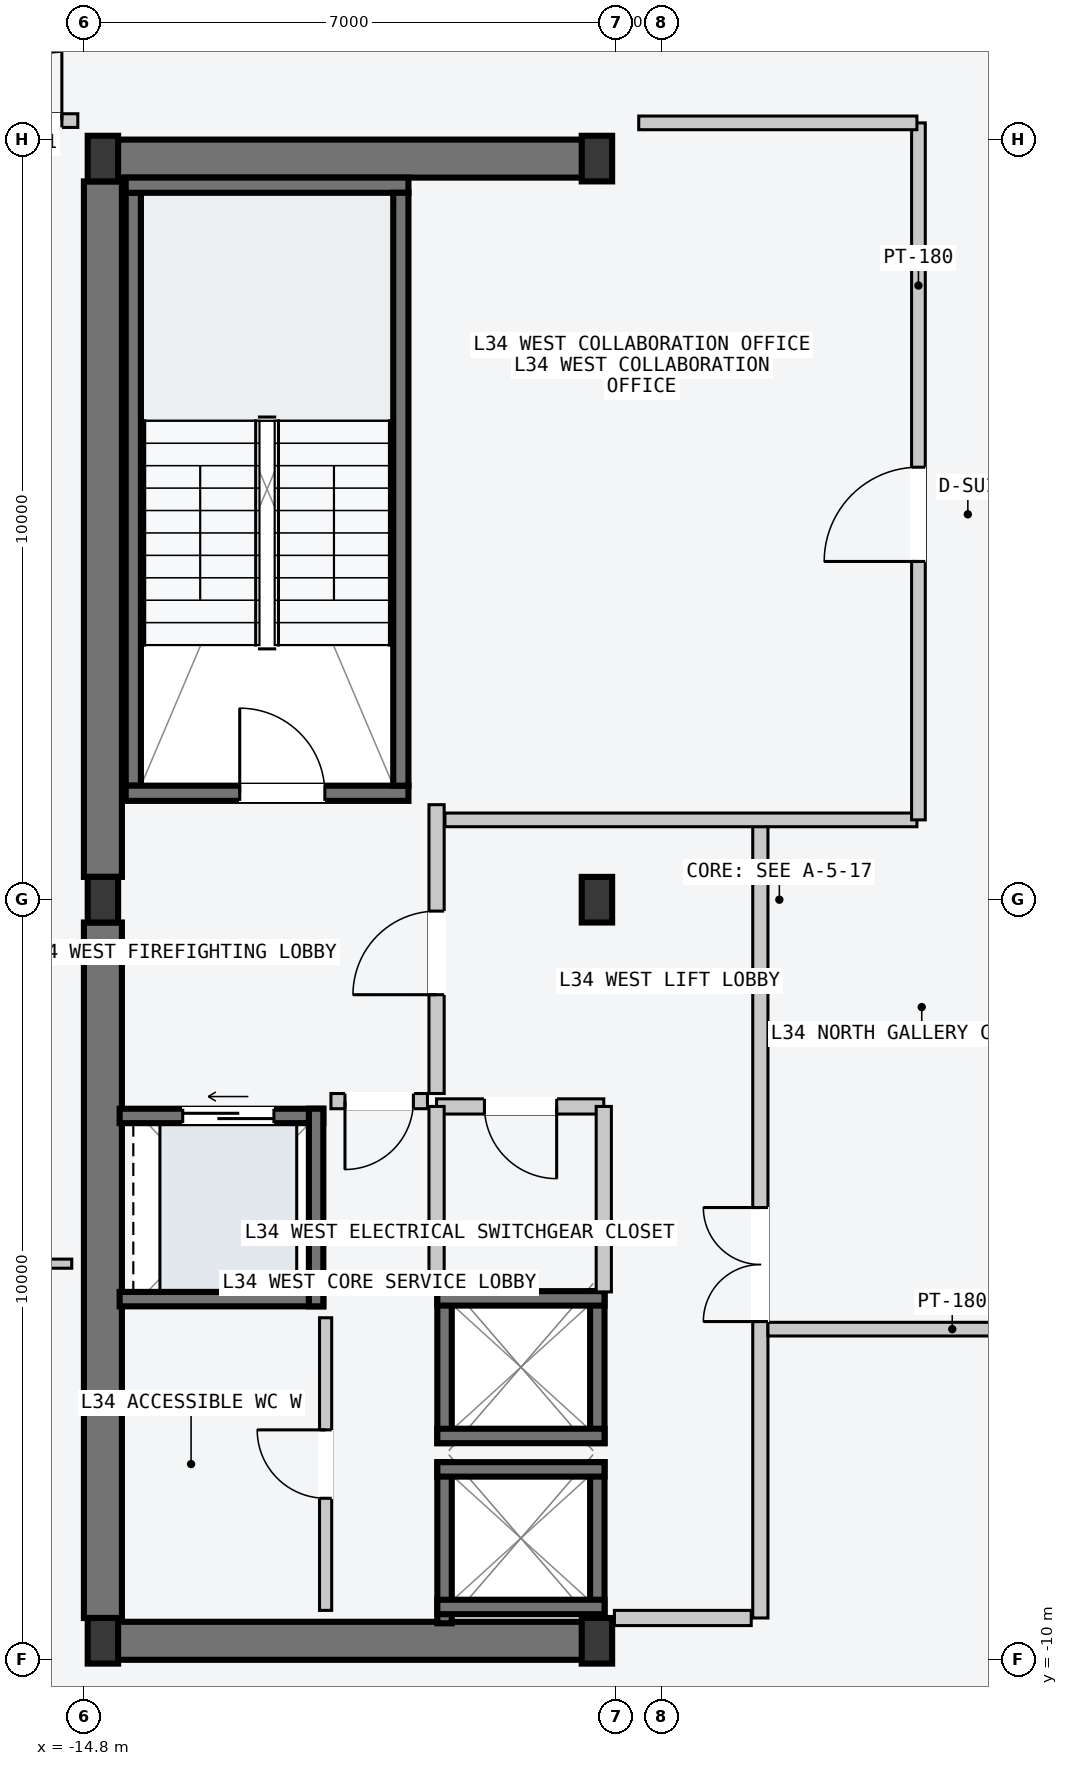
"""IFC4 building model, lengths in metres.
Left out: names, types, materials, properties, quantities, classifications, styles, units other than length and angle.
Written with IfcOpenShell. Run it as: python <this file> out.ifc"""

import sys

from ifc_helpers import new_model, si_unit, direction, frame, frame_2d, origin, origin_2d, place, context, subcontext, project, spatial, rectangle, i_section, extrude, element, fill, save


model = new_model("IFC4")
c1 = context("Model", 3, precision=1e-05, world=origin(), true_north=direction((0.0, 1.0)))
c2 = subcontext(c1, "Body", "Model", "MODEL_VIEW")
j1 = project(units=[si_unit("LENGTHUNIT", "METRE"), si_unit("PLANEANGLEUNIT", "RADIAN")], contexts=[c1])
p1 = place(None, origin())
s1 = spatial("IfcSite", under=j1, at=p1, CompositionType="ELEMENT")
p2 = place(p1, origin())
s2 = spatial("IfcBuilding", under=s1, at=p2, CompositionType="ELEMENT")
p3 = place(p2, frame((0.0, 0.0, 131.4)))
s3 = spatial("IfcBuildingStorey", under=s2, at=p3, CompositionType="ELEMENT", Elevation=131.4)
for number, where, z_axis, x_axis in (
    (1, (-14.53, -9.75, -0.2), (0.0, 0.0, 1.0), (1.0, 0.0, 0.0)),
    (2, (-14.53, 9.75, -0.2), (0.0, 0.0, 1.0), (1.0, 0.0, 0.0)),
):
    element("IfcWall", number, at=place(p3, frame(where, z_axis=z_axis, x_axis=x_axis)), inside=s3, PredefinedType="SHEAR", context=c2, shape_type="SweptSolid", body=[
        extrude(rectangle(XDim=6.46, YDim=0.5, at=frame_2d((3.23, 0.0))), origin(), (0.0, 0.0, 1.0), 3.6),
    ])
for number, where, z_axis, x_axis in (
    (3, (-14.55, -9.45, -0.2), (0.0, 0.0, 1.0), (0.0, 1.0, 0.0)),
    (4, (-14.55, 0.3, -0.2), (0.0, 0.0, 1.0), (0.0, 1.0, 0.0)),
):
    element("IfcWall", number, at=place(p3, frame(where, z_axis=z_axis, x_axis=x_axis)), inside=s3, PredefinedType="SHEAR", context=c2, shape_type="SweptSolid", body=[
        extrude(rectangle(XDim=9.15, YDim=0.5, at=frame_2d((4.575, 0.0))), origin(), (0.0, 0.0, 1.0), 3.6),
    ])
p4 = place(p3, frame((-14.15, 1.5, -0.2), z_axis=(0.0, 0.0, 1.0), x_axis=(0.0, 1.0, 0.0)))
e5 = element("IfcWall", 5, at=p4, inside=s3, PredefinedType="SOLIDWALL", context=c2, shape_type="SweptSolid", body=[
    extrude(rectangle(XDim=7.8, YDim=0.2, at=frame_2d((3.9, 0.0))), origin(), (0.0, 0.0, 1.0), 3.6),
])
p5 = place(p3, frame((-14.25, 1.4, -0.2), z_axis=(0.0, 0.0, 1.0), x_axis=(1.0, 0.0, 0.0)))
e6 = element("IfcWall", 6, at=p5, inside=s3, PredefinedType="SOLIDWALL", context=c2, shape_type="SweptSolid", body=[
    extrude(rectangle(XDim=3.72, YDim=0.2, at=frame_2d((1.86, 0.0))), origin(), (0.0, 0.0, 1.0), 3.6),
])
p6 = place(p5, frame((1.5, 0.0, 0.2)))
e7 = element("IfcOpeningElement", 7, at=p6, cuts=e6, PredefinedType="OPENING", context=c2, shape_type="SweptSolid", body=[
    extrude(rectangle(XDim=1.12, YDim=2.18, at=frame_2d((0.56, 1.09))), frame((0.0, 0.11, 0.0), z_axis=(0.0, -1.0, 0.0), x_axis=(1.0, 0.0, 0.0)), (0.0, 0.0, 1.0), 0.22),
])
p7 = place(p3, frame((-14.25, 9.4, -0.2), z_axis=(0.0, 0.0, 1.0), x_axis=(1.0, 0.0, 0.0)))
e8 = element("IfcWall", 8, at=p7, inside=s3, PredefinedType="SOLIDWALL", context=c2, shape_type="SweptSolid", body=[
    extrude(rectangle(XDim=3.72, YDim=0.2, at=frame_2d((1.86, 0.0))), origin(), (0.0, 0.0, 1.0), 3.6),
])
p8 = place(p3, frame((-10.63, 1.5, -0.2), z_axis=(0.0, 0.0, 1.0), x_axis=(0.0, 1.0, 0.0)))
e9 = element("IfcWall", 9, at=p8, inside=s3, PredefinedType="SOLIDWALL", context=c2, shape_type="SweptSolid", body=[
    extrude(rectangle(XDim=7.8, YDim=0.2, at=frame_2d((3.9, 0.0))), origin(), (0.0, 0.0, 1.0), 3.6),
])
for number, where, z_axis, x_axis in (
    (10, (-14.55, -9.75, 0.0), (0.0, 0.0, 1.0), (1.0, 0.0, 0.0)),
    (11, (-14.55, 0.0, 0.0), (0.0, 0.0, 1.0), (1.0, 0.0, 0.0)),
    (12, (-14.55, 9.75, 0.0), (0.0, 0.0, 1.0), (1.0, 0.0, 0.0)),
    (13, (-8.05, -9.75, 0.0), (0.0, 0.0, 1.0), (1.0, 0.0, 0.0)),
    (14, (-8.05, 0.0, 0.0), (0.0, 0.0, 1.0), (1.0, 0.0, 0.0)),
    (15, (-8.05, 9.75, 0.0), (0.0, 0.0, 1.0), (1.0, 0.0, 0.0)),
):
    element("IfcColumn", number, at=place(p3, frame(where, z_axis=z_axis, x_axis=x_axis)), inside=s3, PredefinedType="COLUMN", context=c2, shape_type="SweptSolid", body=[
        extrude(i_section(OverallWidth=0.4, OverallDepth=0.6, WebThickness=0.022, FlangeThickness=0.036, at=origin_2d()), origin(), (0.0, 0.0, 1.0), 3.6),
    ])
for number, where, z_axis, x_axis in (
    (16, (-8.045, -9.52, -0.2), (0.0, 0.0, 1.0), (0.0, 1.0, 0.0)),
    (17, (-10.055, -9.52, -0.2), (0.0, 0.0, 1.0), (0.0, 1.0, 0.0)),
):
    element("IfcWall", number, at=place(p3, frame(where, z_axis=z_axis, x_axis=x_axis)), inside=s3, PredefinedType="SOLIDWALL", context=c2, shape_type="SweptSolid", body=[
        extrude(rectangle(XDim=2.12, YDim=0.19, at=frame_2d((1.06, 0.0))), origin(), (0.0, 0.0, 1.0), 3.6),
    ])
for number, where, z_axis, x_axis in (
    (18, (-10.15, -7.495, -0.2), (0.0, 0.0, 1.0), (1.0, 0.0, 0.0)),
    (19, (-10.15, -9.305, -0.2), (0.0, 0.0, 1.0), (1.0, 0.0, 0.0)),
):
    element("IfcWall", number, at=place(p3, frame(where, z_axis=z_axis, x_axis=x_axis)), inside=s3, PredefinedType="SOLIDWALL", context=c2, shape_type="SweptSolid", body=[
        extrude(rectangle(XDim=2.2, YDim=0.19, at=frame_2d((1.1, 0.0))), origin(), (0.0, 0.0, 1.0), 3.6),
    ])
for number, where, z_axis, x_axis in (
    (20, (-8.045, -7.15, -0.2), (0.0, 0.0, 1.0), (0.0, 1.0, 0.0)),
    (21, (-10.055, -7.15, -0.2), (0.0, 0.0, 1.0), (0.0, 1.0, 0.0)),
):
    element("IfcWall", number, at=place(p3, frame(where, z_axis=z_axis, x_axis=x_axis)), inside=s3, PredefinedType="SOLIDWALL", context=c2, shape_type="SweptSolid", body=[
        extrude(rectangle(XDim=2.0, YDim=0.19, at=frame_2d((1.0, 0.0))), origin(), (0.0, 0.0, 1.0), 3.6),
    ])
for number, where, z_axis, x_axis in (
    (22, (-10.15, -5.245, -0.2), (0.0, 0.0, 1.0), (1.0, 0.0, 0.0)),
    (23, (-10.15, -7.055, -0.2), (0.0, 0.0, 1.0), (1.0, 0.0, 0.0)),
):
    element("IfcWall", number, at=place(p3, frame(where, z_axis=z_axis, x_axis=x_axis)), inside=s3, PredefinedType="SOLIDWALL", context=c2, shape_type="SweptSolid", body=[
        extrude(rectangle(XDim=2.2, YDim=0.19, at=frame_2d((1.1, 0.0))), origin(), (0.0, 0.0, 1.0), 3.6),
    ])
p9 = place(p3, frame((-14.33, -2.845, -0.2), z_axis=(0.0, 0.0, 1.0), x_axis=(1.0, 0.0, 0.0)))
e24 = element("IfcWall", 24, at=p9, inside=s3, PredefinedType="SOLIDWALL", context=c2, shape_type="SweptSolid", body=[
    extrude(rectangle(XDim=2.68, YDim=0.19, at=frame_2d((1.34, 0.0))), origin(), (0.0, 0.0, 1.0), 3.6),
])
p10 = place(p9, frame((0.83, 0.0, 0.2)))
e25 = element("IfcOpeningElement", 25, at=p10, cuts=e24, PredefinedType="OPENING", context=c2, shape_type="SweptSolid", body=[
    extrude(rectangle(XDim=1.2, YDim=2.2, at=frame_2d((0.6, 1.1))), frame((0.0, 0.105, 0.0), z_axis=(0.0, -1.0, 0.0), x_axis=(1.0, 0.0, 0.0)), (0.0, 0.0, 1.0), 0.21),
])
p11 = place(p3, frame((-14.33, -5.255, -0.2), z_axis=(0.0, 0.0, 1.0), x_axis=(1.0, 0.0, 0.0)))
e26 = element("IfcWall", 26, at=p11, inside=s3, PredefinedType="SOLIDWALL", context=c2, shape_type="SweptSolid", body=[
    extrude(rectangle(XDim=2.68, YDim=0.19, at=frame_2d((1.34, 0.0))), origin(), (0.0, 0.0, 1.0), 3.6),
])
p12 = place(p3, frame((-11.745, -5.35, -0.2), z_axis=(0.0, 0.0, 1.0), x_axis=(0.0, 1.0, 0.0)))
e27 = element("IfcWall", 27, at=p12, inside=s3, PredefinedType="SOLIDWALL", context=c2, shape_type="SweptSolid", body=[
    extrude(rectangle(XDim=2.6, YDim=0.19, at=frame_2d((1.3, 0.0))), origin(), (0.0, 0.0, 1.0), 3.6),
])
p13 = place(p3, frame((-5.9, -9.45, 0.0), z_axis=(0.0, 0.0, 1.0), x_axis=(0.0, 1.0, 0.0)))
e28 = element("IfcWall", 28, at=p13, inside=s3, PredefinedType="PARTITIONING", context=c2, shape_type="SweptSolid", body=[
    extrude(rectangle(XDim=10.5, YDim=0.2, at=frame_2d((5.25, 0.0))), origin(), (0.0, 0.0, 1.0), 3.4),
])
p14 = place(p13, frame((3.9, 0.0, 0.0)))
e29 = element("IfcOpeningElement", 29, at=p14, cuts=e28, PredefinedType="OPENING", context=c2, shape_type="SweptSolid", body=[
    extrude(rectangle(XDim=1.5, YDim=2.2, at=frame_2d((0.75, 1.1))), frame((0.0, 0.11, 0.0), z_axis=(0.0, -1.0, 0.0), x_axis=(1.0, 0.0, 0.0)), (0.0, 0.0, 1.0), 0.22),
])
p15 = place(p3, frame((-6.02, -9.45, 0.0), z_axis=(0.0, 0.0, 1.0), x_axis=(-1.0, 0.0, 0.0)))
e30 = element("IfcWall", 30, at=p15, inside=s3, PredefinedType="PARTITIONING", context=c2, shape_type="SweptSolid", body=[
    extrude(rectangle(XDim=1.8, YDim=0.2, at=frame_2d((0.9, 0.0))), origin(), (0.0, 0.0, 1.0), 3.4),
])
p16 = place(p3, frame((-10.16, -2.55, 0.0), z_axis=(0.0, 0.0, 1.0), x_axis=(0.0, 1.0, 0.0)))
e31 = element("IfcWall", 31, at=p16, inside=s3, PredefinedType="PARTITIONING", context=c2, shape_type="SweptSolid", body=[
    extrude(rectangle(XDim=3.8, YDim=0.2, at=frame_2d((1.9, 0.0))), origin(), (0.0, 0.0, 1.0), 3.4),
])
p17 = place(p16, frame((1.3, 0.0, 0.0)))
e32 = element("IfcOpeningElement", 32, at=p17, cuts=e31, PredefinedType="OPENING", context=c2, shape_type="SweptSolid", body=[
    extrude(rectangle(XDim=1.1, YDim=2.15, at=frame_2d((0.55, 1.075))), frame((0.0, 0.11, 0.0), z_axis=(0.0, -1.0, 0.0), x_axis=(1.0, 0.0, 0.0)), (0.0, 0.0, 1.0), 0.22),
])
p18 = place(p3, frame((-10.28, -2.65, 0.0), z_axis=(0.0, 0.0, 1.0), x_axis=(-1.0, 0.0, 0.0)))
e33 = element("IfcWall", 33, at=p18, inside=s3, PredefinedType="PARTITIONING", context=c2, shape_type="SweptSolid", body=[
    extrude(rectangle(XDim=1.27, YDim=0.2, at=frame_2d((0.635, 0.0))), origin(), (0.0, 0.0, 1.0), 3.4),
])
p19 = place(p18, frame((0.185, 0.0, 0.0)))
e34 = element("IfcOpeningElement", 34, at=p19, cuts=e33, PredefinedType="OPENING", context=c2, shape_type="SweptSolid", body=[
    extrude(rectangle(XDim=0.9, YDim=2.15, at=frame_2d((0.45, 1.075))), frame((0.0, 0.11, 0.0), z_axis=(0.0, -1.0, 0.0), x_axis=(1.0, 0.0, 0.0)), (0.0, 0.0, 1.0), 0.22),
])
p20 = place(p3, frame((-7.96, -2.72, 0.0), z_axis=(0.0, 0.0, 1.0), x_axis=(-1.0, 0.0, 0.0)))
e35 = element("IfcWall", 35, at=p20, inside=s3, PredefinedType="PARTITIONING", context=c2, shape_type="SweptSolid", body=[
    extrude(rectangle(XDim=2.2, YDim=0.2, at=frame_2d((1.1, 0.0))), origin(), (0.0, 0.0, 1.0), 3.4),
])
p21 = place(p20, frame((0.62, 0.0, 0.0)))
e36 = element("IfcOpeningElement", 36, at=p21, cuts=e35, PredefinedType="OPENING", context=c2, shape_type="SweptSolid", body=[
    extrude(rectangle(XDim=0.95, YDim=2.1, at=frame_2d((0.475, 1.05))), frame((0.0, 0.11, 0.0), z_axis=(0.0, -1.0, 0.0), x_axis=(1.0, 0.0, 0.0)), (0.0, 0.0, 1.0), 0.22),
])
for number, where, z_axis, x_axis in (
    (37, (-7.96, -5.16, 0.0), (0.0, 0.0, 1.0), (0.0, 1.0, 0.0)),
    (38, (-10.16, -5.16, 0.0), (0.0, 0.0, 1.0), (0.0, 1.0, 0.0)),
):
    element("IfcWall", number, at=place(p3, frame(where, z_axis=z_axis, x_axis=x_axis)), inside=s3, PredefinedType="PARTITIONING", context=c2, shape_type="SweptSolid", body=[
        extrude(rectangle(XDim=2.44, YDim=0.2, at=frame_2d((1.22, 0.0))), origin(), (0.0, 0.0, 1.0), 3.4),
    ])
p22 = place(p3, frame((-11.62, -9.35, 0.0), z_axis=(0.0, 0.0, 1.0), x_axis=(0.0, 1.0, 0.0)))
e39 = element("IfcWall", 39, at=p22, inside=s3, PredefinedType="PARTITIONING", context=c2, shape_type="SweptSolid", body=[
    extrude(rectangle(XDim=3.85, YDim=0.16, at=frame_2d((1.925, 0.0))), origin(), (0.0, 0.0, 1.0), 3.4),
])
p23 = place(p22, frame((1.475, 0.0, 0.0)))
e40 = element("IfcOpeningElement", 40, at=p23, cuts=e39, PredefinedType="OPENING", context=c2, shape_type="SweptSolid", body=[
    extrude(rectangle(XDim=0.9, YDim=2.15, at=frame_2d((0.45, 1.075))), frame((0.0, 0.09, 0.0), z_axis=(0.0, -1.0, 0.0), x_axis=(1.0, 0.0, 0.0)), (0.0, 0.0, 1.0), 0.18),
])
p24 = place(p3, frame((-10.05, 1.05, 0.0), z_axis=(0.0, 0.0, 1.0), x_axis=(1.0, 0.0, 0.0)))
e41 = element("IfcWall", 41, at=p24, inside=s3, PredefinedType="PARTITIONING", context=c2, shape_type="SweptSolid", body=[
    extrude(rectangle(XDim=6.21, YDim=0.18, at=frame_2d((3.105, 0.0))), origin(), (0.0, 0.0, 1.0), 3.4),
])
p25 = place(p3, frame((-3.82, 1.05, 0.0), z_axis=(0.0, 0.0, 1.0), x_axis=(0.0, 1.0, 0.0)))
e42 = element("IfcWall", 42, at=p25, inside=s3, PredefinedType="PARTITIONING", context=c2, shape_type="SweptSolid", body=[
    extrude(rectangle(XDim=9.17, YDim=0.18, at=frame_2d((4.585, 0.0))), origin(), (0.0, 0.0, 1.0), 3.4),
])
p26 = place(p25, frame((3.4, 0.0, 0.0)))
e43 = element("IfcOpeningElement", 43, at=p26, cuts=e42, PredefinedType="OPENING", context=c2, shape_type="SweptSolid", body=[
    extrude(rectangle(XDim=1.24, YDim=2.24, at=frame_2d((0.62, 1.12))), frame((0.0, 0.1, 0.0), z_axis=(0.0, -1.0, 0.0), x_axis=(1.0, 0.0, 0.0)), (0.0, 0.0, 1.0), 0.2),
])
p27 = place(p3, frame((-7.5, 10.22, 0.0), z_axis=(0.0, 0.0, 1.0), x_axis=(1.0, 0.0, 0.0)))
e44 = element("IfcWall", 44, at=p27, inside=s3, PredefinedType="PARTITIONING", context=c2, shape_type="SweptSolid", body=[
    extrude(rectangle(XDim=3.66, YDim=0.18, at=frame_2d((1.83, 0.0))), origin(), (0.0, 0.0, 1.0), 3.4),
])
p28 = place(p3, frame((-5.8, -5.65, 0.0), z_axis=(0.0, 0.0, 1.0), x_axis=(1.0, 0.0, 0.0)))
e45 = element("IfcWall", 45, at=p28, inside=s3, PredefinedType="PARTITIONING", context=c2, shape_type="SweptSolid", body=[
    extrude(rectangle(XDim=11.6, YDim=0.18, at=frame_2d((5.8, 0.0))), origin(), (0.0, 0.0, 1.0), 3.4),
])
p29 = place(p28, frame((5.1, 0.0, 0.0)))
e46 = element("IfcOpeningElement", 46, at=p29, cuts=e45, PredefinedType="OPENING", context=c2, shape_type="SweptSolid", body=[
    extrude(rectangle(XDim=1.4, YDim=2.2, at=frame_2d((0.7, 1.1))), frame((0.0, 0.1, 0.0), z_axis=(0.0, -1.0, 0.0), x_axis=(1.0, 0.0, 0.0)), (0.0, 0.0, 1.0), 0.2),
])
p30 = place(p3, frame((-16.2, 10.25, 0.0), z_axis=(0.0, 0.0, 1.0), x_axis=(1.0, 0.0, 0.0)))
e47 = element("IfcWall", 47, at=p30, inside=s3, PredefinedType="PARTITIONING", context=c2, shape_type="SweptSolid", body=[
    extrude(rectangle(XDim=1.32, YDim=0.18, at=frame_2d((0.66, 0.0))), origin(), (0.0, 0.0, 1.0), 3.4),
])
p31 = place(p30, frame((0.21, 0.0, 0.0)))
e48 = element("IfcOpeningElement", 48, at=p31, cuts=e47, PredefinedType="OPENING", context=c2, shape_type="SweptSolid", body=[
    extrude(rectangle(XDim=0.9, YDim=2.15, at=frame_2d((0.45, 1.075))), frame((0.0, 0.1, 0.0), z_axis=(0.0, -1.0, 0.0), x_axis=(1.0, 0.0, 0.0)), (0.0, 0.0, 1.0), 0.2),
])
p32 = place(p3, frame((-22.56, -4.788, 0.0), z_axis=(0.0, 0.0, 1.0), x_axis=(1.0, 0.0, 0.0)))
e49 = element("IfcWall", 49, at=p32, inside=s3, PredefinedType="PARTITIONING", context=c2, shape_type="SweptSolid", body=[
    extrude(rectangle(XDim=7.6, YDim=0.12, at=frame_2d((3.8, 0.0))), origin(), (0.0, 0.0, 1.0), 3.4),
])
p33 = place(p32, frame((0.9, 0.0, 0.0)))
e50 = element("IfcOpeningElement", 50, at=p33, cuts=e49, PredefinedType="OPENING", context=c2, shape_type="SweptSolid", body=[
    extrude(rectangle(XDim=0.96, YDim=2.18, at=frame_2d((0.48, 1.09))), frame((0.0, 0.07, 0.0), z_axis=(0.0, -1.0, 0.0), x_axis=(1.0, 0.0, 0.0)), (0.0, 0.0, 1.0), 0.14),
])
p34 = place(p6, origin())
e51 = element("IfcDoor", 51, at=p34, inside=s3, OperationType="SINGLE_SWING_LEFT", PredefinedType="DOOR", context=c2, shape_type="SweptSolid", body=[
    extrude(rectangle(XDim=1.12, YDim=2.18, at=frame_2d((0.56, 1.09))), frame((0.0, 0.025, 0.0), z_axis=(0.0, -1.0, 0.0), x_axis=(1.0, 0.0, 0.0)), (0.0, 0.0, 1.0), 0.05),
])
fill(e7, e51)
p35 = place(p10, origin())
e52 = element("IfcDoor", 52, at=p35, inside=s3, OperationType="SLIDING_TO_LEFT", PredefinedType="DOOR", context=c2, shape_type="SweptSolid", body=[
    extrude(rectangle(XDim=1.2, YDim=2.2, at=frame_2d((0.6, 1.1))), frame((0.0, 0.025, 0.0), z_axis=(0.0, -1.0, 0.0), x_axis=(1.0, 0.0, 0.0)), (0.0, 0.0, 1.0), 0.05),
])
fill(e25, e52)
p36 = place(p14, origin())
e53 = element("IfcDoor", 53, at=p36, inside=s3, OperationType="DOUBLE_DOOR_SINGLE_SWING", PredefinedType="DOOR", context=c2, shape_type="SweptSolid", body=[
    extrude(rectangle(XDim=1.5, YDim=2.2, at=frame_2d((0.75, 1.1))), frame((0.0, 0.025, 0.0), z_axis=(0.0, -1.0, 0.0), x_axis=(1.0, 0.0, 0.0)), (0.0, 0.0, 1.0), 0.05),
])
fill(e29, e53)
p37 = place(p17, origin())
e54 = element("IfcDoor", 54, at=p37, inside=s3, OperationType="SINGLE_SWING_LEFT", PredefinedType="DOOR", context=c2, shape_type="SweptSolid", body=[
    extrude(rectangle(XDim=1.1, YDim=2.15, at=frame_2d((0.55, 1.075))), frame((0.0, 0.025, 0.0), z_axis=(0.0, -1.0, 0.0), x_axis=(1.0, 0.0, 0.0)), (0.0, 0.0, 1.0), 0.05),
])
fill(e32, e54)
p38 = place(p19, origin())
e55 = element("IfcDoor", 55, at=p38, inside=s3, OperationType="SINGLE_SWING_RIGHT", PredefinedType="DOOR", context=c2, shape_type="SweptSolid", body=[
    extrude(rectangle(XDim=0.9, YDim=2.15, at=frame_2d((0.45, 1.075))), frame((0.0, 0.025, 0.0), z_axis=(0.0, -1.0, 0.0), x_axis=(1.0, 0.0, 0.0)), (0.0, 0.0, 1.0), 0.05),
])
fill(e34, e55)
p39 = place(p21, origin())
e56 = element("IfcDoor", 56, at=p39, inside=s3, OperationType="SINGLE_SWING_LEFT", PredefinedType="DOOR", context=c2, shape_type="SweptSolid", body=[
    extrude(rectangle(XDim=0.95, YDim=2.1, at=frame_2d((0.475, 1.05))), frame((0.0, 0.025, 0.0), z_axis=(0.0, -1.0, 0.0), x_axis=(1.0, 0.0, 0.0)), (0.0, 0.0, 1.0), 0.05),
])
fill(e36, e56)
p40 = place(p23, origin())
e57 = element("IfcDoor", 57, at=p40, inside=s3, OperationType="SINGLE_SWING_RIGHT", PredefinedType="DOOR", context=c2, shape_type="SweptSolid", body=[
    extrude(rectangle(XDim=0.9, YDim=2.15, at=frame_2d((0.45, 1.075))), frame((0.0, 0.025, 0.0), z_axis=(0.0, -1.0, 0.0), x_axis=(1.0, 0.0, 0.0)), (0.0, 0.0, 1.0), 0.05),
])
fill(e40, e57)
p41 = place(p26, origin())
e58 = element("IfcDoor", 58, at=p41, inside=s3, OperationType="SINGLE_SWING_LEFT", PredefinedType="DOOR", context=c2, shape_type="SweptSolid", body=[
    extrude(rectangle(XDim=1.24, YDim=2.24, at=frame_2d((0.62, 1.12))), frame((0.0, 0.025, 0.0), z_axis=(0.0, -1.0, 0.0), x_axis=(1.0, 0.0, 0.0)), (0.0, 0.0, 1.0), 0.05),
])
fill(e43, e58)
p42 = place(p31, origin())
e59 = element("IfcDoor", 59, at=p42, inside=s3, OperationType="SINGLE_SWING_RIGHT", PredefinedType="DOOR", context=c2, shape_type="SweptSolid", body=[
    extrude(rectangle(XDim=0.9, YDim=2.15, at=frame_2d((0.45, 1.075))), frame((0.0, 0.025, 0.0), z_axis=(0.0, -1.0, 0.0), x_axis=(1.0, 0.0, 0.0)), (0.0, 0.0, 1.0), 0.05),
])
fill(e48, e59)
save(model, sys.argv[1])
